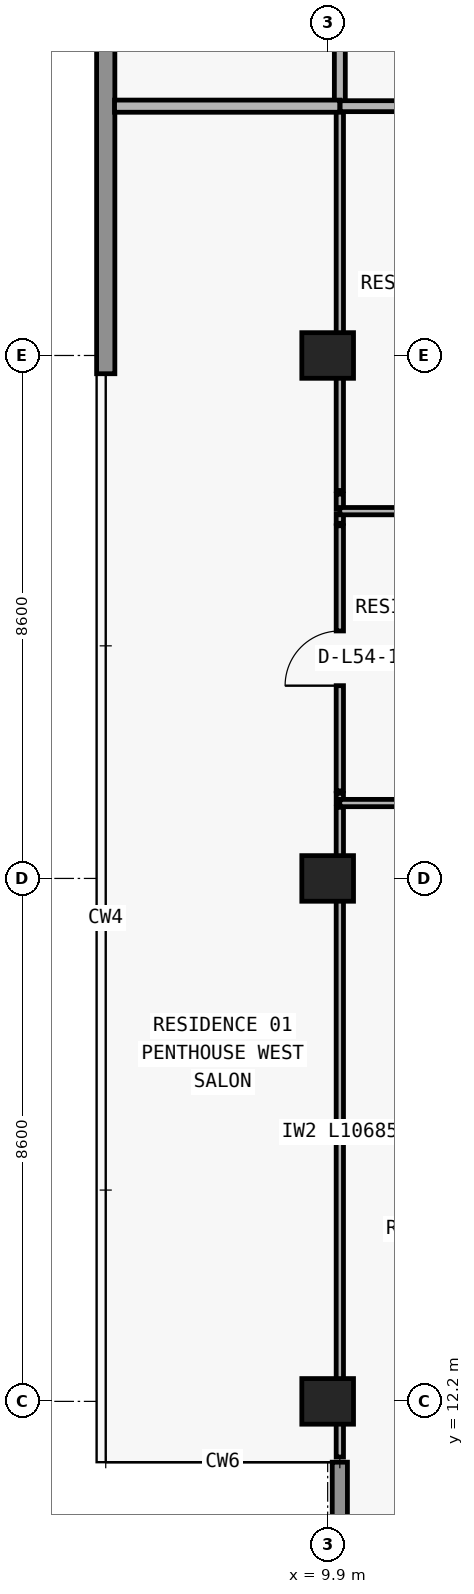
"""IFC4 building model, lengths in metres.
Left out: names, types, materials, properties, quantities, classifications, styles, units other than length and angle.
Written with IfcOpenShell. Run it as: python <this file> out.ifc"""

import sys

from ifc_helpers import new_model, si_unit, direction, frame, frame_2d, origin, origin_2d, place, context, subcontext, project, spatial, rectangle, extrude, element, fill, save


model = new_model("IFC4")
c1 = context("Model", 3, precision=1e-05, world=origin(), true_north=direction((0.0, 1.0)))
c2 = subcontext(c1, "Body", "Model", "MODEL_VIEW")
j1 = project(units=[si_unit("LENGTHUNIT", "METRE"), si_unit("PLANEANGLEUNIT", "RADIAN")], contexts=[c1])
p1 = place(None, origin())
s1 = spatial("IfcSite", under=j1, at=p1, CompositionType="ELEMENT")
p2 = place(p1, origin())
s2 = spatial("IfcBuilding", under=s1, at=p2, CompositionType="ELEMENT")
p3 = place(p2, frame((0.0, 0.0, 195.0)))
s3 = spatial("IfcBuildingStorey", under=s2, at=p3, CompositionType="ELEMENT", Elevation=195.0)
for number, where, z_axis, x_axis in (
    (1, (9.9, 12.2, 0.0), (0.0, 0.0, 1.0), (1.0, 0.0, 0.0)),
    (2, (9.9, 20.8, 0.0), (0.0, 0.0, 1.0), (1.0, 0.0, 0.0)),
    (3, (9.9, 29.4, 0.0), (0.0, 0.0, 1.0), (1.0, 0.0, 0.0)),
):
    element("IfcColumn", number, at=place(p3, frame(where, z_axis=z_axis, x_axis=x_axis)), inside=s3, PredefinedType="COLUMN", context=c2, shape_type="SweptSolid", body=[
        extrude(rectangle(XDim=0.85, YDim=0.75, at=origin_2d()), origin(), (0.0, 0.0, 1.0), 3.05),
    ])
p4 = place(p3, frame((10.1, 11.2, 0.0), z_axis=(0.0, 0.0, 1.0), x_axis=(0.0, -1.0, 0.0)))
e4 = element("IfcWall", 4, at=p4, inside=s3, PredefinedType="ELEMENTEDWALL", context=c2, shape_type="SweptSolid", body=[
    extrude(rectangle(XDim=3.45, YDim=0.25, at=frame_2d((1.725, 0.0))), origin(), (0.0, 0.0, 1.0), 3.05),
])
p5 = place(p3, frame((6.25, 29.1, 0.0), z_axis=(0.0, 0.0, 1.0), x_axis=(0.0, 1.0, 0.0)))
e5 = element("IfcWall", 5, at=p5, inside=s3, PredefinedType="STANDARD", context=c2, shape_type="SweptSolid", body=[
    extrude(rectangle(XDim=17.9, YDim=0.3, at=frame_2d((8.95, 0.0))), origin(), (0.0, 0.0, 1.0), 3.05),
])
p6 = place(p3, frame((10.1, 11.285, 0.0), z_axis=(0.0, 0.0, 1.0), x_axis=(0.0, 1.0, 0.0)))
e6 = element("IfcWall", 6, at=p6, inside=s3, PredefinedType="PARTITIONING", context=c2, shape_type="SweptSolid", body=[
    extrude(rectangle(XDim=10.685, YDim=0.12, at=frame_2d((5.343, 0.0))), origin(), (0.0, 0.0, 1.0), 2.263),
])
p7 = place(p3, frame((10.1, 22.04, 0.0), z_axis=(0.0, 0.0, 1.0), x_axis=(0.0, 1.0, 0.0)))
e7 = element("IfcWall", 7, at=p7, inside=s3, PredefinedType="PARTITIONING", context=c2, shape_type="SweptSolid", body=[
    extrude(rectangle(XDim=0.16, YDim=0.12, at=frame_2d((0.08, 0.0))), origin(), (0.0, 0.0, 1.0), 2.263),
])
p8 = place(p3, frame((10.1, 22.24, 0.0), z_axis=(0.0, 0.0, 1.0), x_axis=(0.0, 1.0, 0.0)))
e8 = element("IfcWall", 8, at=p8, inside=s3, PredefinedType="PARTITIONING", context=c2, shape_type="SweptSolid", body=[
    extrude(rectangle(XDim=4.36, YDim=0.12, at=frame_2d((2.18, 0.0))), origin(), (0.0, 0.0, 1.0), 2.263),
])
p9 = place(p8, frame((1.73, 0.0, 0.0)))
e9 = element("IfcOpeningElement", 9, at=p9, cuts=e8, PredefinedType="OPENING", context=c2, shape_type="SweptSolid", body=[
    extrude(rectangle(XDim=0.9, YDim=2.15, at=frame_2d((0.45, 1.075))), frame((0.0, 0.07, 0.0), z_axis=(0.0, -1.0, 0.0), x_axis=(1.0, 0.0, 0.0)), (0.0, 0.0, 1.0), 0.14),
])
p10 = place(p3, frame((10.1, 26.64, 0.0), z_axis=(0.0, 0.0, 1.0), x_axis=(0.0, 1.0, 0.0)))
e10 = element("IfcWall", 10, at=p10, inside=s3, PredefinedType="PARTITIONING", context=c2, shape_type="SweptSolid", body=[
    extrude(rectangle(XDim=0.16, YDim=0.12, at=frame_2d((0.08, 0.0))), origin(), (0.0, 0.0, 1.0), 2.263),
])
p11 = place(p3, frame((10.1, 26.88, 0.0), z_axis=(0.0, 0.0, 1.0), x_axis=(0.0, 1.0, 0.0)))
e11 = element("IfcWall", 11, at=p11, inside=s3, PredefinedType="PARTITIONING", context=c2, shape_type="SweptSolid", body=[
    extrude(rectangle(XDim=0.24, YDim=0.12, at=frame_2d((0.12, 0.0))), origin(), (0.0, 0.0, 1.0), 2.263),
])
p12 = place(p3, frame((10.1, 27.18, 0.0), z_axis=(0.0, 0.0, 1.0), x_axis=(0.0, 1.0, 0.0)))
e12 = element("IfcWall", 12, at=p12, inside=s3, PredefinedType="PARTITIONING", context=c2, shape_type="SweptSolid", body=[
    extrude(rectangle(XDim=6.32, YDim=0.12, at=frame_2d((3.16, 0.0))), origin(), (0.0, 0.0, 1.0), 2.263),
])
p13 = place(p3, frame((10.1, 33.505, 0.0), z_axis=(0.0, 0.0, 1.0), x_axis=(0.0, 1.0, 0.0)))
e13 = element("IfcWall", 13, at=p13, inside=s3, PredefinedType="PARTITIONING", context=c2, shape_type="SweptSolid", body=[
    extrude(rectangle(XDim=3.495, YDim=0.18, at=frame_2d((1.748, 0.0))), origin(), (0.0, 0.0, 1.0), 2.263),
])
p14 = place(p3, frame((10.1, 22.04, 0.0), z_axis=(0.0, 0.0, 1.0), x_axis=(1.0, 0.0, 0.0)))
e14 = element("IfcWall", 14, at=p14, inside=s3, PredefinedType="PARTITIONING", context=c2, shape_type="SweptSolid", body=[
    extrude(rectangle(XDim=8.2, YDim=0.12, at=frame_2d((4.1, 0.0))), origin(), (0.0, 0.0, 1.0), 3.05),
])
p15 = place(p14, frame((3.65, 0.0, 0.0)))
e15 = element("IfcOpeningElement", 15, at=p15, cuts=e14, PredefinedType="OPENING", context=c2, shape_type="SweptSolid", body=[
    extrude(rectangle(XDim=0.9, YDim=2.15, at=frame_2d((0.45, 1.075))), frame((0.0, 0.07, 0.0), z_axis=(0.0, -1.0, 0.0), x_axis=(1.0, 0.0, 0.0)), (0.0, 0.0, 1.0), 0.14),
])
p16 = place(p3, frame((10.1, 26.84, 0.0), z_axis=(0.0, 0.0, 1.0), x_axis=(1.0, 0.0, 0.0)))
e16 = element("IfcWall", 16, at=p16, inside=s3, PredefinedType="PARTITIONING", context=c2, shape_type="SweptSolid", body=[
    extrude(rectangle(XDim=8.195, YDim=0.12, at=frame_2d((4.097, 0.0))), origin(), (0.0, 0.0, 1.0), 3.05),
])
p17 = place(p16, frame((2.876, 0.0, 0.0)))
e17 = element("IfcOpeningElement", 17, at=p17, cuts=e16, PredefinedType="OPENING", context=c2, shape_type="SweptSolid", body=[
    extrude(rectangle(XDim=0.9, YDim=2.15, at=frame_2d((0.45, 1.075))), frame((0.0, 0.07, 0.0), z_axis=(0.0, -1.0, 0.0), x_axis=(1.0, 0.0, 0.0)), (0.0, 0.0, 1.0), 0.14),
])
p18 = place(p3, frame((6.395, 33.5, 0.0), z_axis=(0.0, 0.0, 1.0), x_axis=(1.0, 0.0, 0.0)))
e18 = element("IfcWall", 18, at=p18, inside=s3, PredefinedType="PARTITIONING", context=c2, shape_type="SweptSolid", body=[
    extrude(rectangle(XDim=3.705, YDim=0.2, at=frame_2d((1.853, 0.0))), origin(), (0.0, 0.0, 1.0), 3.05),
])
p19 = place(p3, frame((10.105, 33.5, 0.0), z_axis=(0.0, 0.0, 1.0), x_axis=(1.0, 0.0, 0.0)))
e19 = element("IfcWall", 19, at=p19, inside=s3, PredefinedType="PARTITIONING", context=c2, shape_type="SweptSolid", body=[
    extrude(rectangle(XDim=57.595, YDim=0.18, at=frame_2d((28.797, 0.0))), origin(), (0.0, 0.0, 1.0), 3.05),
])
p20 = place(p19, frame((2.824, 0.0, 0.0)))
e20 = element("IfcOpeningElement", 20, at=p20, cuts=e19, PredefinedType="OPENING", context=c2, shape_type="SweptSolid", body=[
    extrude(rectangle(XDim=1.0, YDim=2.2, at=frame_2d((0.5, 1.1))), frame((0.0, 0.1, 0.0), z_axis=(0.0, -1.0, 0.0), x_axis=(1.0, 0.0, 0.0)), (0.0, 0.0, 1.0), 0.2),
])
p21 = place(p19, frame((19.47, 0.0, 0.0)))
e21 = element("IfcOpeningElement", 21, at=p21, cuts=e19, PredefinedType="OPENING", context=c2, shape_type="SweptSolid", body=[
    extrude(rectangle(XDim=1.0, YDim=2.2, at=frame_2d((0.5, 1.1))), frame((0.0, 0.1, 0.0), z_axis=(0.0, -1.0, 0.0), x_axis=(1.0, 0.0, 0.0)), (0.0, 0.0, 1.0), 0.2),
])
p22 = place(p19, frame((27.527, 0.0, 0.0)))
e22 = element("IfcOpeningElement", 22, at=p22, cuts=e19, PredefinedType="OPENING", context=c2, shape_type="SweptSolid", body=[
    extrude(rectangle(XDim=1.0, YDim=2.2, at=frame_2d((0.5, 1.1))), frame((0.0, 0.1, 0.0), z_axis=(0.0, -1.0, 0.0), x_axis=(1.0, 0.0, 0.0)), (0.0, 0.0, 1.0), 0.2),
])
p23 = place(p19, frame((43.87, 0.0, 0.0)))
e23 = element("IfcOpeningElement", 23, at=p23, cuts=e19, PredefinedType="OPENING", context=c2, shape_type="SweptSolid", body=[
    extrude(rectangle(XDim=1.0, YDim=2.2, at=frame_2d((0.5, 1.1))), frame((0.0, 0.1, 0.0), z_axis=(0.0, -1.0, 0.0), x_axis=(1.0, 0.0, 0.0)), (0.0, 0.0, 1.0), 0.2),
])
p24 = place(p19, frame((52.17, 0.0, 0.0)))
e24 = element("IfcOpeningElement", 24, at=p24, cuts=e19, PredefinedType="OPENING", context=c2, shape_type="SweptSolid", body=[
    extrude(rectangle(XDim=1.0, YDim=2.2, at=frame_2d((0.5, 1.1))), frame((0.0, 0.1, 0.0), z_axis=(0.0, -1.0, 0.0), x_axis=(1.0, 0.0, 0.0)), (0.0, 0.0, 1.0), 0.2),
])
p25 = place(p9, origin())
e25 = element("IfcDoor", 25, at=p25, inside=s3, OperationType="SINGLE_SWING_LEFT", PredefinedType="DOOR", context=c2, shape_type="SweptSolid", body=[
    extrude(rectangle(XDim=0.9, YDim=2.15, at=frame_2d((0.45, 1.075))), frame((0.0, 0.025, 0.0), z_axis=(0.0, -1.0, 0.0), x_axis=(1.0, 0.0, 0.0)), (0.0, 0.0, 1.0), 0.05),
])
fill(e9, e25)
save(model, sys.argv[1])
